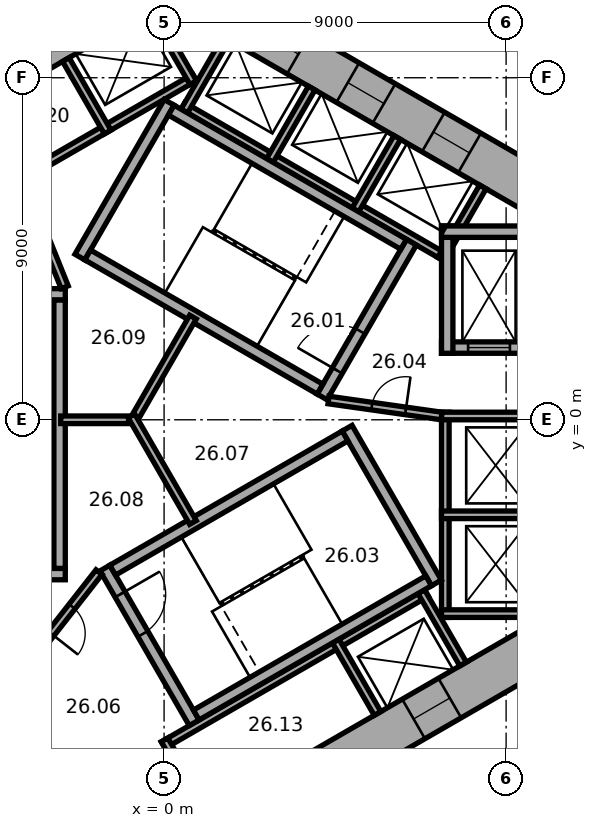
"""IFC4 building model, lengths in metres.
Left out: names, types, materials, properties, quantities, classifications, styles, units other than length and angle.
Written with IfcOpenShell. Run it as: python <this file> out.ifc"""

import sys

from ifc_helpers import new_model, si_unit, direction, frame, frame_2d, origin, place, context, subcontext, project, spatial, rectangle, extrude, element, fill, save


model = new_model("IFC4")
c1 = context("Model", 3, precision=1e-05, world=origin(), true_north=direction((0.0, 1.0)))
c2 = subcontext(c1, "Body", "Model", "MODEL_VIEW")
j1 = project(units=[si_unit("LENGTHUNIT", "METRE"), si_unit("PLANEANGLEUNIT", "RADIAN")], contexts=[c1])
p1 = place(None, origin())
s1 = spatial("IfcSite", under=j1, at=p1, CompositionType="ELEMENT")
p2 = place(p1, origin())
s2 = spatial("IfcBuilding", under=s1, at=p2, CompositionType="ELEMENT")
p3 = place(p2, frame((0.0, 0.0, 110.0)))
s3 = spatial("IfcBuildingStorey", under=s2, at=p3, CompositionType="ELEMENT", Elevation=110.0)
p4 = place(p3, frame((10.4, 5.658, 0.0), z_axis=(0.0, 0.0, 1.0), x_axis=(-0.866021384402, 0.500006961711, 0.0)))
e1 = element("IfcWall", 1, at=p4, inside=s3, PredefinedType="SHEAR", context=c2, shape_type="SweptSolid", body=[
    extrude(rectangle(XDim=12.355, YDim=1.2, at=frame_2d((6.178, 0.0))), origin(), (0.0, 0.0, 1.0), 3.3),
])
p5 = place(p4, frame((2.728, 0.0, 0.0)))
e2 = element("IfcOpeningElement", 2, at=p5, cuts=e1, PredefinedType="OPENING", context=c2, shape_type="SweptSolid", body=[
    extrude(rectangle(XDim=1.1, YDim=2.1, at=frame_2d((0.55, 1.05))), frame((0.0, 0.61, 0.0), z_axis=(0.0, -1.0, 0.0), x_axis=(1.0, 0.0, 0.0)), (0.0, 0.0, 1.0), 1.22),
])
p6 = place(p4, frame((5.328, 0.0, 0.0)))
e3 = element("IfcOpeningElement", 3, at=p6, cuts=e1, PredefinedType="OPENING", context=c2, shape_type="SweptSolid", body=[
    extrude(rectangle(XDim=1.1, YDim=2.1, at=frame_2d((0.55, 1.05))), frame((0.0, 0.61, 0.0), z_axis=(0.0, -1.0, 0.0), x_axis=(1.0, 0.0, 0.0)), (0.0, 0.0, 1.0), 1.22),
])
p7 = place(p4, frame((7.928, 0.0, 0.0)))
e4 = element("IfcOpeningElement", 4, at=p7, cuts=e1, PredefinedType="OPENING", context=c2, shape_type="SweptSolid", body=[
    extrude(rectangle(XDim=1.1, YDim=2.1, at=frame_2d((0.55, 1.05))), frame((0.0, 0.61, 0.0), z_axis=(0.0, -1.0, 0.0), x_axis=(1.0, 0.0, 0.0)), (0.0, 0.0, 1.0), 1.22),
])
p8 = place(p3, frame((0.3, 11.836, 0.0), z_axis=(0.0, 0.0, 1.0), x_axis=(-0.866021384402, -0.500006961711, 0.0)))
e5 = element("IfcWall", 5, at=p8, inside=s3, PredefinedType="SHEAR", context=c2, shape_type="SweptSolid", body=[
    extrude(rectangle(XDim=12.355, YDim=1.2, at=frame_2d((6.178, 0.0))), origin(), (0.0, 0.0, 1.0), 3.3),
])
p9 = place(p8, frame((6.378, 0.0, 0.0)))
e6 = element("IfcOpeningElement", 6, at=p9, cuts=e5, PredefinedType="OPENING", context=c2, shape_type="SweptSolid", body=[
    extrude(rectangle(XDim=1.5, YDim=2.1, at=frame_2d((0.75, 1.05))), frame((0.0, 0.61, 0.0), z_axis=(0.0, -1.0, 0.0), x_axis=(1.0, 0.0, 0.0)), (0.0, 0.0, 1.0), 1.22),
])
p10 = place(p8, frame((1.828, 0.0, 0.0)))
e7 = element("IfcOpeningElement", 7, at=p10, cuts=e5, PredefinedType="OPENING", context=c2, shape_type="SweptSolid", body=[
    extrude(rectangle(XDim=1.1, YDim=2.1, at=frame_2d((0.55, 1.05))), frame((0.0, 0.61, 0.0), z_axis=(0.0, -1.0, 0.0), x_axis=(1.0, 0.0, 0.0)), (0.0, 0.0, 1.0), 1.22),
])
p11 = place(p3, frame((-10.4, -5.658, 0.0), z_axis=(0.0, 0.0, 1.0), x_axis=(0.866021384402, -0.500006961711, 0.0)))
e8 = element("IfcWall", 8, at=p11, inside=s3, PredefinedType="SHEAR", context=c2, shape_type="SweptSolid", body=[
    extrude(rectangle(XDim=12.355, YDim=1.2, at=frame_2d((6.178, 0.0))), origin(), (0.0, 0.0, 1.0), 3.3),
])
p12 = place(p11, frame((6.378, 0.0, 0.0)))
e9 = element("IfcOpeningElement", 9, at=p12, cuts=e8, PredefinedType="OPENING", context=c2, shape_type="SweptSolid", body=[
    extrude(rectangle(XDim=1.5, YDim=2.1, at=frame_2d((0.75, 1.05))), frame((0.0, 0.61, 0.0), z_axis=(0.0, -1.0, 0.0), x_axis=(1.0, 0.0, 0.0)), (0.0, 0.0, 1.0), 1.22),
])
p13 = place(p11, frame((1.928, 0.0, 0.0)))
e10 = element("IfcOpeningElement", 10, at=p13, cuts=e8, PredefinedType="OPENING", context=c2, shape_type="SweptSolid", body=[
    extrude(rectangle(XDim=0.9, YDim=2.1, at=frame_2d((0.45, 1.05))), frame((0.0, 0.61, 0.0), z_axis=(0.0, -1.0, 0.0), x_axis=(1.0, 0.0, 0.0)), (0.0, 0.0, 1.0), 1.22),
])
p14 = place(p11, frame((4.528, 0.0, 0.0)))
e11 = element("IfcOpeningElement", 11, at=p14, cuts=e8, PredefinedType="OPENING", context=c2, shape_type="SweptSolid", body=[
    extrude(rectangle(XDim=0.9, YDim=2.1, at=frame_2d((0.45, 1.05))), frame((0.0, 0.61, 0.0), z_axis=(0.0, -1.0, 0.0), x_axis=(1.0, 0.0, 0.0)), (0.0, 0.0, 1.0), 1.22),
])
p15 = place(p3, frame((-0.3, -11.836, 0.0), z_axis=(0.0, 0.0, 1.0), x_axis=(0.866021384402, 0.500006961711, 0.0)))
e12 = element("IfcWall", 12, at=p15, inside=s3, PredefinedType="SHEAR", context=c2, shape_type="SweptSolid", body=[
    extrude(rectangle(XDim=12.355, YDim=1.2, at=frame_2d((6.178, 0.0))), origin(), (0.0, 0.0, 1.0), 3.3),
])
p16 = place(p15, frame((4.128, 0.0, 0.0)))
e13 = element("IfcOpeningElement", 13, at=p16, cuts=e12, PredefinedType="OPENING", context=c2, shape_type="SweptSolid", body=[
    extrude(rectangle(XDim=0.9, YDim=2.1, at=frame_2d((0.45, 1.05))), frame((0.0, 0.61, 0.0), z_axis=(0.0, -1.0, 0.0), x_axis=(1.0, 0.0, 0.0)), (0.0, 0.0, 1.0), 1.22),
])
p17 = place(p15, frame((7.928, 0.0, 0.0)))
e14 = element("IfcOpeningElement", 14, at=p17, cuts=e12, PredefinedType="OPENING", context=c2, shape_type="SweptSolid", body=[
    extrude(rectangle(XDim=1.1, YDim=2.1, at=frame_2d((0.55, 1.05))), frame((0.0, 0.61, 0.0), z_axis=(0.0, -1.0, 0.0), x_axis=(1.0, 0.0, 0.0)), (0.0, 0.0, 1.0), 1.22),
])
p18 = place(p3, frame((7.4, -5.2, 0.0), z_axis=(0.0, 0.0, 1.0), x_axis=(0.0, 1.0, 0.0)))
e15 = element("IfcWall", 15, at=p18, inside=s3, PredefinedType="PARTITIONING", context=c2, shape_type="SweptSolid", body=[
    extrude(rectangle(XDim=5.4, YDim=0.2, at=frame_2d((2.7, 0.0))), origin(), (0.0, 0.0, 1.0), 3.05),
])
for number, where, z_axis, x_axis in (
    (16, (7.3, -5.1, 0.0), (0.0, 0.0, 1.0), (1.0, 0.0, 0.0)),
    (17, (7.3, -2.5, 0.0), (0.0, 0.0, 1.0), (1.0, 0.0, 0.0)),
    (18, (7.3, 0.1, 0.0), (0.0, 0.0, 1.0), (1.0, 0.0, 0.0)),
):
    element("IfcWall", number, at=place(p3, frame(where, z_axis=z_axis, x_axis=x_axis)), inside=s3, PredefinedType="PARTITIONING", context=c2, shape_type="SweptSolid", body=[
        extrude(rectangle(XDim=2.2, YDim=0.2, at=frame_2d((1.1, 0.0))), origin(), (0.0, 0.0, 1.0), 3.05),
    ])
p19 = place(p3, frame((7.424, 4.259, 0.0), z_axis=(0.0, 0.0, 1.0), x_axis=(-0.866026010844, 0.49999894854, 0.0)))
e19 = element("IfcWall", 19, at=p19, inside=s3, PredefinedType="PARTITIONING", context=c2, shape_type="SweptSolid", body=[
    extrude(rectangle(XDim=8.0, YDim=0.2, at=frame_2d((4.0, 0.0))), origin(), (0.0, 0.0, 1.0), 3.05),
])
for number, where, z_axis, x_axis in (
    (20, (7.287, 4.222, 0.0), (0.0, 0.0, 1.0), (0.5, 0.866, 0.0)),
    (21, (5.036, 5.522, 0.0), (0.0, 0.0, 1.0), (0.5, 0.866, 0.0)),
    (22, (2.784, 6.822, 0.0), (0.0, 0.0, 1.0), (0.5, 0.866, 0.0)),
    (23, (0.532, 8.122, 0.0), (0.0, 0.0, 1.0), (0.5, 0.866, 0.0)),
):
    element("IfcWall", number, at=place(p3, frame(where, z_axis=z_axis, x_axis=x_axis)), inside=s3, PredefinedType="PARTITIONING", context=c2, shape_type="SweptSolid", body=[
        extrude(rectangle(XDim=2.2, YDim=0.2, at=frame_2d((1.1, 0.0))), origin(), (0.0, 0.0, 1.0), 3.05),
    ])
p20 = place(p3, frame((0.803, 9.009, 0.0), z_axis=(0.0, 0.0, 1.0), x_axis=(-0.866028230842, -0.499995103361, 0.0)))
e24 = element("IfcWall", 24, at=p20, inside=s3, PredefinedType="PARTITIONING", context=c2, shape_type="SweptSolid", body=[
    extrude(rectangle(XDim=5.4, YDim=0.2, at=frame_2d((2.7, 0.0))), origin(), (0.0, 0.0, 1.0), 3.05),
])
p21 = place(p3, frame((0.767, 8.872, 0.0), z_axis=(0.0, 0.0, 1.0), x_axis=(-0.499994660107, 0.866028486751, 0.0)))
e25 = element("IfcWall", 25, at=p21, inside=s3, PredefinedType="PARTITIONING", context=c2, shape_type="SweptSolid", body=[
    extrude(rectangle(XDim=2.2, YDim=0.2, at=frame_2d((1.1, 0.0))), origin(), (0.0, 0.0, 1.0), 3.05),
])
p22 = place(p3, frame((-1.485, 7.572, 0.0), z_axis=(0.0, 0.0, 1.0), x_axis=(-0.50002983664, 0.866008176907, 0.0)))
e26 = element("IfcWall", 26, at=p22, inside=s3, PredefinedType="PARTITIONING", context=c2, shape_type="SweptSolid", body=[
    extrude(rectangle(XDim=2.2, YDim=0.2, at=frame_2d((1.1, 0.0))), origin(), (0.0, 0.0, 1.0), 3.05),
])
p23 = place(p3, frame((-0.024, -8.559, 0.0), z_axis=(0.0, 0.0, 1.0), x_axis=(0.866026010844, 0.49999894854, 0.0)))
e27 = element("IfcWall", 27, at=p23, inside=s3, PredefinedType="PARTITIONING", context=c2, shape_type="SweptSolid", body=[
    extrude(rectangle(XDim=8.0, YDim=0.2, at=frame_2d((4.0, 0.0))), origin(), (0.0, 0.0, 1.0), 3.05),
])
for number, where, z_axis, x_axis in (
    (28, (0.013, -8.422, 0.0), (0.0, 0.0, 1.0), (0.5, -0.866, 0.0)),
    (29, (4.516, -5.822, 0.0), (0.0, 0.0, 1.0), (0.5, -0.866, 0.0)),
    (30, (6.768, -4.522, 0.0), (0.0, 0.0, 1.0), (0.5, -0.866, 0.0)),
):
    element("IfcWall", number, at=place(p3, frame(where, z_axis=z_axis, x_axis=x_axis)), inside=s3, PredefinedType="PARTITIONING", context=c2, shape_type="SweptSolid", body=[
        extrude(rectangle(XDim=2.2, YDim=0.2, at=frame_2d((1.1, 0.0))), origin(), (0.0, 0.0, 1.0), 3.05),
    ])
p24 = place(p3, frame((4.158, 0.602, 0.0), z_axis=(0.0, 0.0, 1.0), x_axis=(0.499977259774, 0.866038532462, 0.0)))
e31 = element("IfcWall", 31, at=p24, inside=s3, PredefinedType="SHEAR", context=c2, shape_type="SweptSolid", body=[
    extrude(rectangle(XDim=4.7, YDim=0.3, at=frame_2d((2.35, 0.0))), origin(), (0.0, 0.0, 1.0), 3.05),
])
p25 = place(p24, frame((0.8, 0.0, 0.0)))
e32 = element("IfcOpeningElement", 32, at=p25, cuts=e31, PredefinedType="OPENING", context=c2, shape_type="SweptSolid", body=[
    extrude(rectangle(XDim=1.2, YDim=2.1, at=frame_2d((0.6, 1.05))), frame((0.0, 0.16, 0.0), z_axis=(0.0, -1.0, 0.0), x_axis=(1.0, 0.0, 0.0)), (0.0, 0.0, 1.0), 0.32),
])
p26 = place(p3, frame((-2.216, 4.282, 0.0), z_axis=(0.0, 0.0, 1.0), x_axis=(0.499977259774, 0.866038532462, 0.0)))
e33 = element("IfcWall", 33, at=p26, inside=s3, PredefinedType="SHEAR", context=c2, shape_type="SweptSolid", body=[
    extrude(rectangle(XDim=4.7, YDim=0.3, at=frame_2d((2.35, 0.0))), origin(), (0.0, 0.0, 1.0), 3.05),
])
for number, where, z_axis, x_axis in (
    (34, (4.103, 0.807, 0.0), (0.0, 0.0, 1.0), (-0.866, 0.5, 0.0)),
    (35, (6.303, 4.617, 0.0), (0.0, 0.0, 1.0), (-0.866, 0.5, 0.0)),
):
    element("IfcWall", number, at=place(p3, frame(where, z_axis=z_axis, x_axis=x_axis)), inside=s3, PredefinedType="SHEAR", context=c2, shape_type="SweptSolid", body=[
        extrude(rectangle(XDim=7.06, YDim=0.3, at=frame_2d((3.53, 0.0))), origin(), (0.0, 0.0, 1.0), 3.05),
    ])
p27 = place(p3, frame((-2.6, 3.3, 0.0), z_axis=(0.0, 0.0, 1.0), x_axis=(-1.0, 0.0, 0.0)))
e36 = element("IfcWall", 36, at=p27, inside=s3, PredefinedType="SHEAR", context=c2, shape_type="SweptSolid", body=[
    extrude(rectangle(XDim=4.7, YDim=0.3, at=frame_2d((2.35, 0.0))), origin(), (0.0, 0.0, 1.0), 3.05),
])
p28 = place(p27, frame((0.8, 0.0, 0.0)))
e37 = element("IfcOpeningElement", 37, at=p28, cuts=e36, PredefinedType="OPENING", context=c2, shape_type="SweptSolid", body=[
    extrude(rectangle(XDim=1.2, YDim=2.1, at=frame_2d((0.6, 1.05))), frame((0.0, 0.16, 0.0), z_axis=(0.0, -1.0, 0.0), x_axis=(1.0, 0.0, 0.0)), (0.0, 0.0, 1.0), 0.32),
])
p29 = place(p3, frame((-2.6, -4.06, 0.0), z_axis=(0.0, 0.0, 1.0), x_axis=(-1.0, 0.0, 0.0)))
e38 = element("IfcWall", 38, at=p29, inside=s3, PredefinedType="SHEAR", context=c2, shape_type="SweptSolid", body=[
    extrude(rectangle(XDim=4.7, YDim=0.3, at=frame_2d((2.35, 0.0))), origin(), (0.0, 0.0, 1.0), 3.05),
])
p30 = place(p3, frame((-2.75, 3.15, 0.0), z_axis=(0.0, 0.0, 1.0), x_axis=(0.0, -1.0, 0.0)))
e39 = element("IfcWall", 39, at=p30, inside=s3, PredefinedType="SHEAR", context=c2, shape_type="SweptSolid", body=[
    extrude(rectangle(XDim=7.06, YDim=0.3, at=frame_2d((3.53, 0.0))), origin(), (0.0, 0.0, 1.0), 3.05),
])
p31 = place(p3, frame((-1.558, -3.902, 0.0), z_axis=(0.0, 0.0, 1.0), x_axis=(0.499977259774, -0.866038532462, 0.0)))
e40 = element("IfcWall", 40, at=p31, inside=s3, PredefinedType="SHEAR", context=c2, shape_type="SweptSolid", body=[
    extrude(rectangle(XDim=4.7, YDim=0.3, at=frame_2d((2.35, 0.0))), origin(), (0.0, 0.0, 1.0), 3.05),
])
p32 = place(p31, frame((0.8, 0.0, 0.0)))
e41 = element("IfcOpeningElement", 41, at=p32, cuts=e40, PredefinedType="OPENING", context=c2, shape_type="SweptSolid", body=[
    extrude(rectangle(XDim=1.2, YDim=2.1, at=frame_2d((0.6, 1.05))), frame((0.0, 0.16, 0.0), z_axis=(0.0, -1.0, 0.0), x_axis=(1.0, 0.0, 0.0)), (0.0, 0.0, 1.0), 0.32),
])
p33 = place(p3, frame((4.816, -0.222, 0.0), z_axis=(0.0, 0.0, 1.0), x_axis=(0.499977259774, -0.866038532462, 0.0)))
e42 = element("IfcWall", 42, at=p33, inside=s3, PredefinedType="SHEAR", context=c2, shape_type="SweptSolid", body=[
    extrude(rectangle(XDim=4.7, YDim=0.3, at=frame_2d((2.35, 0.0))), origin(), (0.0, 0.0, 1.0), 3.05),
])
for number, where, z_axis, x_axis in (
    (43, (-1.353, -3.957, 0.0), (0.0, 0.0, 1.0), (0.866, 0.5, 0.0)),
    (44, (0.847, -7.767, 0.0), (0.0, 0.0, 1.0), (0.866, 0.5, 0.0)),
):
    element("IfcWall", number, at=place(p3, frame(where, z_axis=z_axis, x_axis=x_axis)), inside=s3, PredefinedType="SHEAR", context=c2, shape_type="SweptSolid", body=[
        extrude(rectangle(XDim=7.06, YDim=0.3, at=frame_2d((3.53, 0.0))), origin(), (0.0, 0.0, 1.0), 3.05),
    ])
p34 = place(p3, frame((7.3, 1.9, 0.0), z_axis=(0.0, 0.0, 1.0), x_axis=(1.0, 0.0, 0.0)))
e45 = element("IfcWall", 45, at=p34, inside=s3, PredefinedType="SHEAR", context=c2, shape_type="SweptSolid", body=[
    extrude(rectangle(XDim=2.2, YDim=0.3, at=frame_2d((1.1, 0.0))), origin(), (0.0, 0.0, 1.0), 3.05),
])
p35 = place(p34, frame((0.7, 0.0, 0.0)))
e46 = element("IfcOpeningElement", 46, at=p35, cuts=e45, PredefinedType="OPENING", context=c2, shape_type="SweptSolid", body=[
    extrude(rectangle(XDim=1.1, YDim=2.1, at=frame_2d((0.55, 1.05))), frame((0.0, 0.16, 0.0), z_axis=(0.0, -1.0, 0.0), x_axis=(1.0, 0.0, 0.0)), (0.0, 0.0, 1.0), 0.32),
])
p36 = place(p3, frame((7.45, 1.75, 0.0), z_axis=(0.0, 0.0, 1.0), x_axis=(0.0, 1.0, 0.0)))
e47 = element("IfcWall", 47, at=p36, inside=s3, PredefinedType="SHEAR", context=c2, shape_type="SweptSolid", body=[
    extrude(rectangle(XDim=3.35, YDim=0.3, at=frame_2d((1.675, 0.0))), origin(), (0.0, 0.0, 1.0), 3.05),
])
p37 = place(p3, frame((7.3, 4.95, 0.0), z_axis=(0.0, 0.0, 1.0), x_axis=(1.0, 0.0, 0.0)))
e48 = element("IfcWall", 48, at=p37, inside=s3, PredefinedType="SHEAR", context=c2, shape_type="SweptSolid", body=[
    extrude(rectangle(XDim=2.2, YDim=0.3, at=frame_2d((1.1, 0.0))), origin(), (0.0, 0.0, 1.0), 3.05),
])
p38 = place(p3, frame((4.327, 0.521, 0.0), z_axis=(0.0, 0.0, 1.0), x_axis=(0.990124376366, -0.14019172346, 0.0)))
e49 = element("IfcWall", 49, at=p38, inside=s3, PredefinedType="PARTITIONING", context=c2, shape_type="SweptSolid", body=[
    extrude(rectangle(XDim=3.002, YDim=0.2, at=frame_2d((1.501, 0.0))), origin(), (0.0, 0.0, 1.0), 3.05),
])
p39 = place(p38, frame((1.15, 0.0, 0.0)))
e50 = element("IfcOpeningElement", 50, at=p39, cuts=e49, PredefinedType="OPENING", context=c2, shape_type="SweptSolid", body=[
    extrude(rectangle(XDim=0.9, YDim=2.1, at=frame_2d((0.45, 1.05))), frame((0.0, 0.11, 0.0), z_axis=(0.0, -1.0, 0.0), x_axis=(1.0, 0.0, 0.0)), (0.0, 0.0, 1.0), 0.22),
])
p40 = place(p3, frame((-2.615, 3.487, 0.0), z_axis=(0.0, 0.0, 1.0), x_axis=(-0.373576831041, 0.92759924068, 0.0)))
e51 = element("IfcWall", 51, at=p40, inside=s3, PredefinedType="PARTITIONING", context=c2, shape_type="SweptSolid", body=[
    extrude(rectangle(XDim=3.002, YDim=0.2, at=frame_2d((1.501, 0.0))), origin(), (0.0, 0.0, 1.0), 3.05),
])
p41 = place(p40, frame((1.15, 0.0, 0.0)))
e52 = element("IfcOpeningElement", 52, at=p41, cuts=e51, PredefinedType="OPENING", context=c2, shape_type="SweptSolid", body=[
    extrude(rectangle(XDim=0.9, YDim=2.1, at=frame_2d((0.45, 1.05))), frame((0.0, 0.11, 0.0), z_axis=(0.0, -1.0, 0.0), x_axis=(1.0, 0.0, 0.0)), (0.0, 0.0, 1.0), 0.22),
])
p42 = place(p3, frame((-1.712, -4.008, 0.0), z_axis=(0.0, 0.0, 1.0), x_axis=(-0.616549420702, -0.787316208287, 0.0)))
e53 = element("IfcWall", 53, at=p42, inside=s3, PredefinedType="PARTITIONING", context=c2, shape_type="SweptSolid", body=[
    extrude(rectangle(XDim=3.002, YDim=0.2, at=frame_2d((1.501, 0.0))), origin(), (0.0, 0.0, 1.0), 3.05),
])
p43 = place(p42, frame((1.15, 0.0, 0.0)))
e54 = element("IfcOpeningElement", 54, at=p43, cuts=e53, PredefinedType="OPENING", context=c2, shape_type="SweptSolid", body=[
    extrude(rectangle(XDim=0.9, YDim=2.1, at=frame_2d((0.45, 1.05))), frame((0.0, 0.11, 0.0), z_axis=(0.0, -1.0, 0.0), x_axis=(1.0, 0.0, 0.0)), (0.0, 0.0, 1.0), 0.22),
])
p44 = place(p3, frame((-0.68, 0.0, 0.0), z_axis=(0.0, 0.0, 1.0), x_axis=(-1.0, 0.0, 0.0)))
e55 = element("IfcWall", 55, at=p44, inside=s3, PredefinedType="PARTITIONING", context=c2, shape_type="SweptSolid", body=[
    extrude(rectangle(XDim=2.04, YDim=0.2, at=frame_2d((1.02, 0.0))), origin(), (0.0, 0.0, 1.0), 3.05),
])
for number, where, z_axis, x_axis in (
    (56, (-0.86, -0.104, 0.0), (0.0, 0.0, 1.0), (0.5, 0.866, 0.0)),
    (57, (-0.86, 0.104, 0.0), (0.0, 0.0, 1.0), (0.5, -0.866, 0.0)),
):
    element("IfcWall", number, at=place(p3, frame(where, z_axis=z_axis, x_axis=x_axis)), inside=s3, PredefinedType="PARTITIONING", context=c2, shape_type="SweptSolid", body=[
        extrude(rectangle(XDim=3.24, YDim=0.2, at=frame_2d((1.62, 0.0))), origin(), (0.0, 0.0, 1.0), 3.05),
    ])
p45 = place(p3, frame((-11.615, -7.843, 0.0), z_axis=(0.0, 0.0, 1.0), x_axis=(0.866026466995, -0.499998158461, 0.0)))
e58 = element("IfcWall", 58, at=p45, inside=s3, PredefinedType="PARTITIONING", context=c2, shape_type="SweptSolid", body=[
    extrude(rectangle(XDim=12.315, YDim=0.2, at=frame_2d((6.158, 0.0))), origin(), (0.0, 0.0, 1.0), 3.05),
])
p46 = place(p45, frame((5.983, 0.0, 0.0)))
e59 = element("IfcOpeningElement", 59, at=p46, cuts=e58, PredefinedType="OPENING", context=c2, shape_type="SweptSolid", body=[
    extrude(rectangle(XDim=0.9, YDim=2.1, at=frame_2d((0.45, 1.05))), frame((0.0, 0.11, 0.0), z_axis=(0.0, -1.0, 0.0), x_axis=(1.0, 0.0, 0.0)), (0.0, 0.0, 1.0), 0.22),
])
p47 = place(p45, frame((10.229, 0.0, 0.0)))
e60 = element("IfcOpeningElement", 60, at=p47, cuts=e58, PredefinedType="OPENING", context=c2, shape_type="SweptSolid", body=[
    extrude(rectangle(XDim=0.9, YDim=2.1, at=frame_2d((0.45, 1.05))), frame((0.0, 0.11, 0.0), z_axis=(0.0, -1.0, 0.0), x_axis=(1.0, 0.0, 0.0)), (0.0, 0.0, 1.0), 0.22),
])
p48 = place(p3, frame((10.885, 9.652, 0.0), z_axis=(0.0, 0.0, 1.0), x_axis=(-0.866033868542, 0.499985338323, 0.0)))
e61 = element("IfcWall", 61, at=p48, inside=s3, PredefinedType="PARTITIONING", context=c2, shape_type="SweptSolid", body=[
    extrude(rectangle(XDim=8.602, YDim=0.2, at=frame_2d((4.301, 0.0))), origin(), (0.0, 0.0, 1.0), 3.05),
])
p49 = place(p48, frame((2.739, 0.0, 0.0)))
e62 = element("IfcOpeningElement", 62, at=p49, cuts=e61, PredefinedType="OPENING", context=c2, shape_type="SweptSolid", body=[
    extrude(rectangle(XDim=1.0, YDim=2.1, at=frame_2d((0.5, 1.05))), frame((0.0, 0.11, 0.0), z_axis=(0.0, -1.0, 0.0), x_axis=(1.0, 0.0, 0.0)), (0.0, 0.0, 1.0), 0.22),
])
p50 = place(p25, origin())
e63 = element("IfcDoor", 63, at=p50, inside=s3, OperationType="SINGLE_SWING_RIGHT", PredefinedType="DOOR", context=c2, shape_type="SweptSolid", body=[
    extrude(rectangle(XDim=1.2, YDim=2.1, at=frame_2d((0.6, 1.05))), frame((0.0, 0.025, 0.0), z_axis=(0.0, -1.0, 0.0), x_axis=(1.0, 0.0, 0.0)), (0.0, 0.0, 1.0), 0.05),
])
fill(e32, e63)
p51 = place(p32, origin())
e64 = element("IfcDoor", 64, at=p51, inside=s3, OperationType="SINGLE_SWING_RIGHT", PredefinedType="DOOR", context=c2, shape_type="SweptSolid", body=[
    extrude(rectangle(XDim=1.2, YDim=2.1, at=frame_2d((0.6, 1.05))), frame((0.0, 0.025, 0.0), z_axis=(0.0, -1.0, 0.0), x_axis=(1.0, 0.0, 0.0)), (0.0, 0.0, 1.0), 0.05),
])
fill(e41, e64)
p52 = place(p39, origin())
e65 = element("IfcDoor", 65, at=p52, inside=s3, OperationType="SINGLE_SWING_LEFT", PredefinedType="DOOR", context=c2, shape_type="SweptSolid", body=[
    extrude(rectangle(XDim=0.9, YDim=2.1, at=frame_2d((0.45, 1.05))), frame((0.0, 0.025, 0.0), z_axis=(0.0, -1.0, 0.0), x_axis=(1.0, 0.0, 0.0)), (0.0, 0.0, 1.0), 0.05),
])
fill(e50, e65)
p53 = place(p43, origin())
e66 = element("IfcDoor", 66, at=p53, inside=s3, OperationType="SINGLE_SWING_LEFT", PredefinedType="DOOR", context=c2, shape_type="SweptSolid", body=[
    extrude(rectangle(XDim=0.9, YDim=2.1, at=frame_2d((0.45, 1.05))), frame((0.0, 0.025, 0.0), z_axis=(0.0, -1.0, 0.0), x_axis=(1.0, 0.0, 0.0)), (0.0, 0.0, 1.0), 0.05),
])
fill(e54, e66)
p54 = place(p35, origin())
e67 = element("IfcDoor", 67, at=p54, inside=s3, OperationType="DOUBLE_DOOR_SLIDING", PredefinedType="DOOR", context=c2, shape_type="SweptSolid", body=[
    extrude(rectangle(XDim=1.1, YDim=2.1, at=frame_2d((0.55, 1.05))), frame((0.0, 0.025, 0.0), z_axis=(0.0, -1.0, 0.0), x_axis=(1.0, 0.0, 0.0)), (0.0, 0.0, 1.0), 0.05),
])
fill(e46, e67)
p55 = place(p5, origin())
e68 = element("IfcDoor", 68, at=p55, inside=s3, OperationType="DOUBLE_DOOR_SLIDING", PredefinedType="DOOR", context=c2, shape_type="SweptSolid", body=[
    extrude(rectangle(XDim=1.1, YDim=2.1, at=frame_2d((0.55, 1.05))), frame((0.0, 0.025, 0.0), z_axis=(0.0, -1.0, 0.0), x_axis=(1.0, 0.0, 0.0)), (0.0, 0.0, 1.0), 0.05),
])
fill(e2, e68)
p56 = place(p6, origin())
e69 = element("IfcDoor", 69, at=p56, inside=s3, OperationType="DOUBLE_DOOR_SLIDING", PredefinedType="DOOR", context=c2, shape_type="SweptSolid", body=[
    extrude(rectangle(XDim=1.1, YDim=2.1, at=frame_2d((0.55, 1.05))), frame((0.0, 0.025, 0.0), z_axis=(0.0, -1.0, 0.0), x_axis=(1.0, 0.0, 0.0)), (0.0, 0.0, 1.0), 0.05),
])
fill(e3, e69)
p57 = place(p7, origin())
e70 = element("IfcDoor", 70, at=p57, inside=s3, OperationType="DOUBLE_DOOR_SLIDING", PredefinedType="DOOR", context=c2, shape_type="SweptSolid", body=[
    extrude(rectangle(XDim=1.1, YDim=2.1, at=frame_2d((0.55, 1.05))), frame((0.0, 0.025, 0.0), z_axis=(0.0, -1.0, 0.0), x_axis=(1.0, 0.0, 0.0)), (0.0, 0.0, 1.0), 0.05),
])
fill(e4, e70)
p58 = place(p17, origin())
e71 = element("IfcDoor", 71, at=p58, inside=s3, OperationType="DOUBLE_DOOR_SLIDING", PredefinedType="DOOR", context=c2, shape_type="SweptSolid", body=[
    extrude(rectangle(XDim=1.1, YDim=2.1, at=frame_2d((0.55, 1.05))), frame((0.0, 0.025, 0.0), z_axis=(0.0, -1.0, 0.0), x_axis=(1.0, 0.0, 0.0)), (0.0, 0.0, 1.0), 0.05),
])
fill(e14, e71)
save(model, sys.argv[1])
